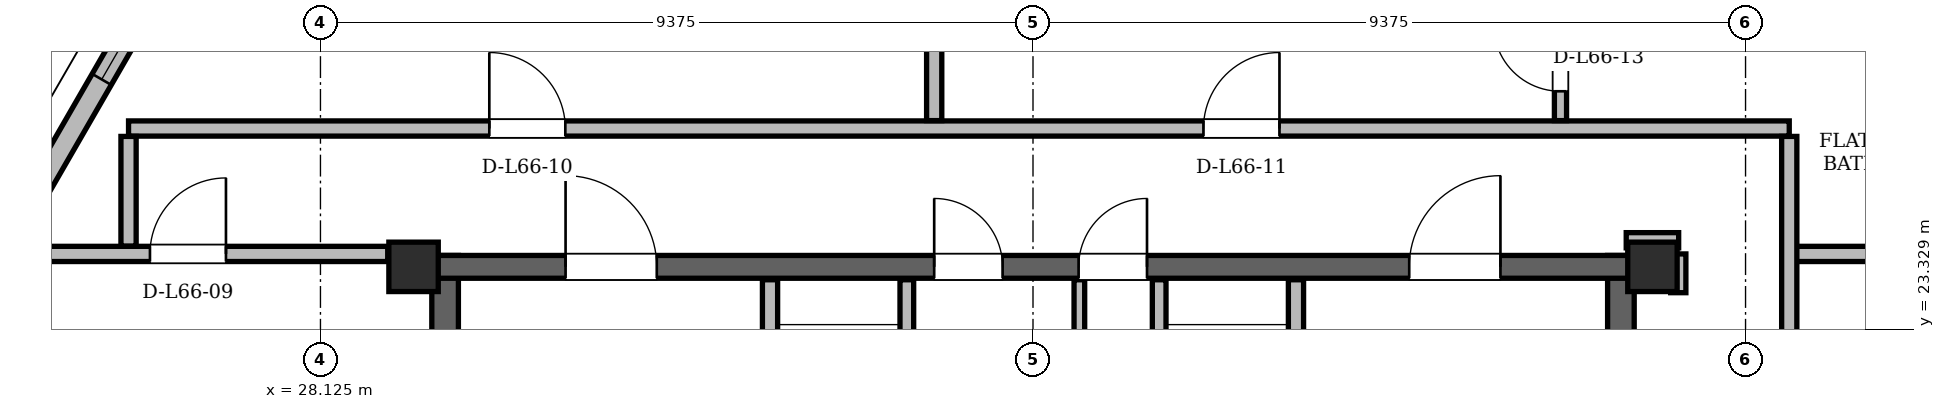
"""IFC4 building model, lengths in metres.
Left out: names, types, materials, properties, quantities, classifications, styles, units other than length and angle.
Written with IfcOpenShell. Run it as: python <this file> out.ifc"""

import sys

from ifc_helpers import new_model, si_unit, direction, frame, frame_2d, origin, origin_2d, place, context, subcontext, project, spatial, rectangle, hollow_rectangle, extrude, element, fill, save


model = new_model("IFC4")
c1 = context("Model", 3, precision=1e-05, world=origin(), true_north=direction((0.0, 1.0)))
c2 = subcontext(c1, "Body", "Model", "MODEL_VIEW")
j1 = project(units=[si_unit("LENGTHUNIT", "METRE"), si_unit("PLANEANGLEUNIT", "RADIAN")], contexts=[c1])
p1 = place(None, origin())
s1 = spatial("IfcSite", under=j1, at=p1, CompositionType="ELEMENT")
p2 = place(p1, origin())
s2 = spatial("IfcBuilding", under=s1, at=p2, CompositionType="ELEMENT")
p3 = place(p2, frame((0.0, 0.0, 249.9)))
s3 = spatial("IfcBuildingStorey", under=s2, at=p3, CompositionType="ELEMENT", Elevation=249.9)
for number, where, z_axis, x_axis in (
    (1, (45.65, 24.15, 0.0), (0.0, 0.0, 1.0), (1.0, 0.0, 0.0)),
    (2, (29.35, 24.15, 0.0), (0.0, 0.0, 1.0), (1.0, 0.0, 0.0)),
):
    element("IfcColumn", number, at=place(p3, frame(where, z_axis=z_axis, x_axis=x_axis)), inside=s3, PredefinedType="COLUMN", context=c2, shape_type="SweptSolid", body=[
        extrude(hollow_rectangle(XDim=0.65, YDim=0.65, WallThickness=0.05, at=origin_2d()), origin(), (0.0, 0.0, 1.0), 3.9),
    ])
for number, where, z_axis, x_axis in (
    (3, (29.765, 11.0, 0.0), (0.0, 0.0, 1.0), (0.0, 1.0, 0.0)),
    (4, (45.235, 11.0, 0.0), (0.0, 0.0, 1.0), (0.0, 1.0, 0.0)),
):
    element("IfcWall", number, at=place(p3, frame(where, z_axis=z_axis, x_axis=x_axis)), inside=s3, PredefinedType="SHEAR", context=c2, shape_type="SweptSolid", body=[
        extrude(rectangle(XDim=13.3, YDim=0.35, at=frame_2d((6.65, 0.0))), origin(), (0.0, 0.0, 1.0), 3.68),
    ])
p4 = place(p3, frame((29.65, 24.15, 0.0), z_axis=(0.0, 0.0, 1.0), x_axis=(1.0, 0.0, 0.0)))
e5 = element("IfcWall", 5, at=p4, inside=s3, PredefinedType="SHEAR", context=c2, shape_type="SweptSolid", body=[
    extrude(rectangle(XDim=15.7, YDim=0.3, at=frame_2d((7.85, 0.0))), origin(), (0.0, 0.0, 1.0), 3.68),
])
p5 = place(p4, frame((1.7, 0.0, 0.0)))
e6 = element("IfcOpeningElement", 6, at=p5, cuts=e5, PredefinedType="OPENING", context=c2, shape_type="SweptSolid", body=[
    extrude(rectangle(XDim=1.2, YDim=2.2, at=frame_2d((0.6, 1.1))), frame((0.0, 0.15, 0.0), z_axis=(0.0, -1.0, 0.0), x_axis=(1.0, 0.0, 0.0)), (0.0, 0.0, 1.0), 0.3),
])
p6 = place(p4, frame((12.8, 0.0, 0.0)))
e7 = element("IfcOpeningElement", 7, at=p6, cuts=e5, PredefinedType="OPENING", context=c2, shape_type="SweptSolid", body=[
    extrude(rectangle(XDim=1.2, YDim=2.2, at=frame_2d((0.6, 1.1))), frame((0.0, 0.15, 0.0), z_axis=(0.0, -1.0, 0.0), x_axis=(1.0, 0.0, 0.0)), (0.0, 0.0, 1.0), 0.3),
])
p7 = place(p4, frame((6.55, 0.0, 0.0)))
e8 = element("IfcOpeningElement", 8, at=p7, cuts=e5, PredefinedType="OPENING", context=c2, shape_type="SweptSolid", body=[
    extrude(rectangle(XDim=0.9, YDim=2.05, at=frame_2d((0.45, 1.025))), frame((0.0, 0.15, 0.0), z_axis=(0.0, -1.0, 0.0), x_axis=(1.0, 0.0, 0.0)), (0.0, 0.0, 1.0), 0.3),
])
p8 = place(p4, frame((8.45, 0.0, 0.0)))
e9 = element("IfcOpeningElement", 9, at=p8, cuts=e5, PredefinedType="OPENING", context=c2, shape_type="SweptSolid", body=[
    extrude(rectangle(XDim=0.9, YDim=2.05, at=frame_2d((0.45, 1.025))), frame((0.0, 0.15, 0.0), z_axis=(0.0, -1.0, 0.0), x_axis=(1.0, 0.0, 0.0)), (0.0, 0.0, 1.0), 0.3),
])
p9 = place(p3, frame((58.774, 10.99, 0.0), z_axis=(0.0, 0.0, 1.0), x_axis=(-0.499994896969, 0.866028350001, 0.0)))
e10 = element("IfcWall", 10, at=p9, inside=s3, PredefinedType="SOLIDWALL", context=c2, shape_type="SweptSolid", body=[
    extrude(rectangle(XDim=37.053, YDim=0.29, at=frame_2d((18.526, 0.0))), origin(), (0.0, 0.0, 1.0), 3.058),
])
p10 = place(p9, frame((6.789, 0.0, 0.0)))
e11 = element("IfcOpeningElement", 11, at=p10, cuts=e10, PredefinedType="OPENING", context=c2, shape_type="SweptSolid", body=[
    extrude(rectangle(XDim=1.5, YDim=2.2, at=frame_2d((0.75, 1.1))), frame((0.0, 0.145, 0.0), z_axis=(0.0, -1.0, 0.0), x_axis=(1.0, 0.0, 0.0)), (0.0, 0.0, 1.0), 0.29),
])
p11 = place(p9, frame((28.148, 0.0, 0.0)))
e12 = element("IfcOpeningElement", 12, at=p11, cuts=e10, PredefinedType="OPENING", context=c2, shape_type="SweptSolid", body=[
    extrude(rectangle(XDim=1.5, YDim=2.2, at=frame_2d((0.75, 1.1))), frame((0.0, 0.145, 0.0), z_axis=(0.0, -1.0, 0.0), x_axis=(1.0, 0.0, 0.0)), (0.0, 0.0, 1.0), 0.29),
])
p12 = place(p9, frame((12.184, 0.0, 0.85)))
e13 = element("IfcOpeningElement", 13, at=p12, cuts=e10, PredefinedType="OPENING", context=c2, shape_type="SweptSolid", body=[
    extrude(rectangle(XDim=2.6, YDim=1.95, at=frame_2d((1.3, 0.975))), frame((0.0, 0.145, 0.0), z_axis=(0.0, -1.0, 0.0), x_axis=(1.0, 0.0, 0.0)), (0.0, 0.0, 1.0), 0.29),
])
p13 = place(p9, frame((1.066, 0.0, 0.85)))
e14 = element("IfcOpeningElement", 14, at=p13, cuts=e10, PredefinedType="OPENING", context=c2, shape_type="SweptSolid", body=[
    extrude(rectangle(XDim=2.4, YDim=1.9, at=frame_2d((1.2, 0.95))), frame((0.0, 0.145, 0.0), z_axis=(0.0, -1.0, 0.0), x_axis=(1.0, 0.0, 0.0)), (0.0, 0.0, 1.0), 0.29),
])
p14 = place(p9, frame((33.328, 0.0, 0.85)))
e15 = element("IfcOpeningElement", 15, at=p14, cuts=e10, PredefinedType="OPENING", context=c2, shape_type="SweptSolid", body=[
    extrude(rectangle(XDim=1.2, YDim=1.48, at=frame_2d((0.6, 0.74))), frame((0.0, 0.145, 0.0), z_axis=(0.0, -1.0, 0.0), x_axis=(1.0, 0.0, 0.0)), (0.0, 0.0, 1.0), 0.29),
])
p15 = place(p9, frame((15.822, 0.0, 0.85)))
e16 = element("IfcOpeningElement", 16, at=p15, cuts=e10, PredefinedType="OPENING", context=c2, shape_type="SweptSolid", body=[
    extrude(rectangle(XDim=1.2, YDim=1.48, at=frame_2d((0.6, 0.74))), frame((0.0, 0.145, 0.0), z_axis=(0.0, -1.0, 0.0), x_axis=(1.0, 0.0, 0.0)), (0.0, 0.0, 1.0), 0.29),
])
p16 = place(p9, frame((23.327, 0.0, 0.85)))
e17 = element("IfcOpeningElement", 17, at=p16, cuts=e10, PredefinedType="OPENING", context=c2, shape_type="SweptSolid", body=[
    extrude(rectangle(XDim=1.2, YDim=1.48, at=frame_2d((0.6, 0.74))), frame((0.0, 0.145, 0.0), z_axis=(0.0, -1.0, 0.0), x_axis=(1.0, 0.0, 0.0)), (0.0, 0.0, 1.0), 0.29),
])
p17 = place(p3, frame((34.752, 43.079, 0.0), z_axis=(0.0, 0.0, 1.0), x_axis=(-0.499994896969, -0.866028350001, 0.0)))
e18 = element("IfcWall", 18, at=p17, inside=s3, PredefinedType="SOLIDWALL", context=c2, shape_type="SweptSolid", body=[
    extrude(rectangle(XDim=37.053, YDim=0.29, at=frame_2d((18.526, 0.0))), origin(), (0.0, 0.0, 1.0), 3.058),
])
p18 = place(p17, frame((3.639, 0.0, 0.0)))
e19 = element("IfcOpeningElement", 19, at=p18, cuts=e18, PredefinedType="OPENING", context=c2, shape_type="SweptSolid", body=[
    extrude(rectangle(XDim=1.5, YDim=2.2, at=frame_2d((0.75, 1.1))), frame((0.0, 0.145, 0.0), z_axis=(0.0, -1.0, 0.0), x_axis=(1.0, 0.0, 0.0)), (0.0, 0.0, 1.0), 0.29),
])
p19 = place(p17, frame((27.518, 0.0, 0.0)))
e20 = element("IfcOpeningElement", 20, at=p19, cuts=e18, PredefinedType="OPENING", context=c2, shape_type="SweptSolid", body=[
    extrude(rectangle(XDim=1.5, YDim=2.2, at=frame_2d((0.75, 1.1))), frame((0.0, 0.145, 0.0), z_axis=(0.0, -1.0, 0.0), x_axis=(1.0, 0.0, 0.0)), (0.0, 0.0, 1.0), 0.29),
])
p20 = place(p17, frame((22.803, 0.0, 0.85)))
e21 = element("IfcOpeningElement", 21, at=p20, cuts=e18, PredefinedType="OPENING", context=c2, shape_type="SweptSolid", body=[
    extrude(rectangle(XDim=1.6, YDim=1.7, at=frame_2d((0.8, 0.85))), frame((0.0, 0.145, 0.0), z_axis=(0.0, -1.0, 0.0), x_axis=(1.0, 0.0, 0.0)), (0.0, 0.0, 1.0), 0.29),
])
p21 = place(p17, frame((34.371, 0.0, 0.85)))
e22 = element("IfcOpeningElement", 22, at=p21, cuts=e18, PredefinedType="OPENING", context=c2, shape_type="SweptSolid", body=[
    extrude(rectangle(XDim=1.4, YDim=1.6, at=frame_2d((0.7, 0.8))), frame((0.0, 0.145, 0.0), z_axis=(0.0, -1.0, 0.0), x_axis=(1.0, 0.0, 0.0)), (0.0, 0.0, 1.0), 0.29),
])
p22 = place(p17, frame((8.135, 0.0, 0.85)))
e23 = element("IfcOpeningElement", 23, at=p22, cuts=e18, PredefinedType="OPENING", context=c2, shape_type="SweptSolid", body=[
    extrude(rectangle(XDim=1.8, YDim=1.75, at=frame_2d((0.9, 0.875))), frame((0.0, 0.145, 0.0), z_axis=(0.0, -1.0, 0.0), x_axis=(1.0, 0.0, 0.0)), (0.0, 0.0, 1.0), 0.29),
])
p23 = place(p17, frame((17.81, 0.0, 0.85)))
e24 = element("IfcOpeningElement", 24, at=p23, cuts=e18, PredefinedType="OPENING", context=c2, shape_type="SweptSolid", body=[
    extrude(rectangle(XDim=1.2, YDim=1.48, at=frame_2d((0.6, 0.74))), frame((0.0, 0.145, 0.0), z_axis=(0.0, -1.0, 0.0), x_axis=(1.0, 0.0, 0.0)), (0.0, 0.0, 1.0), 0.29),
])
p24 = place(p17, frame((1.294, 0.0, 0.85)))
e25 = element("IfcOpeningElement", 25, at=p24, cuts=e18, PredefinedType="OPENING", context=c2, shape_type="SweptSolid", body=[
    extrude(rectangle(XDim=1.6, YDim=1.7, at=frame_2d((0.8, 0.85))), frame((0.0, 0.145, 0.0), z_axis=(0.0, -1.0, 0.0), x_axis=(1.0, 0.0, 0.0)), (0.0, 0.0, 1.0), 0.29),
])
p25 = place(p3, frame((34.04, 19.48, 0.0), z_axis=(0.0, 0.0, 1.0), x_axis=(0.0, 1.0, 0.0)))
e26 = element("IfcWall", 26, at=p25, inside=s3, PredefinedType="PARTITIONING", context=c2, shape_type="SweptSolid", body=[
    extrude(rectangle(XDim=4.5, YDim=0.2, at=frame_2d((2.25, 0.0))), origin(), (0.0, 0.0, 1.0), 3.68),
])
p26 = place(p25, frame((2.12, 0.0, 0.0)))
e27 = element("IfcOpeningElement", 27, at=p26, cuts=e26, PredefinedType="OPENING", context=c2, shape_type="SweptSolid", body=[
    extrude(rectangle(XDim=1.1, YDim=2.2, at=frame_2d((0.55, 1.1))), frame((0.0, 0.1, 0.0), z_axis=(0.0, -1.0, 0.0), x_axis=(1.0, 0.0, 0.0)), (0.0, 0.0, 1.0), 0.2),
])
p27 = place(p3, frame((35.84, 20.96, 0.0), z_axis=(0.0, 0.0, 1.0), x_axis=(0.0, 1.0, 0.0)))
e28 = element("IfcWall", 28, at=p27, inside=s3, PredefinedType="PARTITIONING", context=c2, shape_type="SweptSolid", body=[
    extrude(rectangle(XDim=3.02, YDim=0.18, at=frame_2d((1.51, 0.0))), origin(), (0.0, 0.0, 1.0), 3.68),
])
p28 = place(p3, frame((40.96, 19.48, 0.0), z_axis=(0.0, 0.0, 1.0), x_axis=(0.0, 1.0, 0.0)))
e29 = element("IfcWall", 29, at=p28, inside=s3, PredefinedType="PARTITIONING", context=c2, shape_type="SweptSolid", body=[
    extrude(rectangle(XDim=4.5, YDim=0.2, at=frame_2d((2.25, 0.0))), origin(), (0.0, 0.0, 1.0), 3.68),
])
p29 = place(p28, frame((2.12, 0.0, 0.0)))
e30 = element("IfcOpeningElement", 30, at=p29, cuts=e29, PredefinedType="OPENING", context=c2, shape_type="SweptSolid", body=[
    extrude(rectangle(XDim=1.1, YDim=2.2, at=frame_2d((0.55, 1.1))), frame((0.0, 0.1, 0.0), z_axis=(0.0, -1.0, 0.0), x_axis=(1.0, 0.0, 0.0)), (0.0, 0.0, 1.0), 0.2),
])
p30 = place(p3, frame((39.16, 20.96, 0.0), z_axis=(0.0, 0.0, 1.0), x_axis=(0.0, 1.0, 0.0)))
e31 = element("IfcWall", 31, at=p30, inside=s3, PredefinedType="PARTITIONING", context=c2, shape_type="SweptSolid", body=[
    extrude(rectangle(XDim=3.02, YDim=0.18, at=frame_2d((1.51, 0.0))), origin(), (0.0, 0.0, 1.0), 3.68),
])
p31 = place(p3, frame((38.11, 21.06, 0.0), z_axis=(0.0, 0.0, 1.0), x_axis=(0.0, 1.0, 0.0)))
e32 = element("IfcWall", 32, at=p31, inside=s3, PredefinedType="PARTITIONING", context=c2, shape_type="SweptSolid", body=[
    extrude(rectangle(XDim=2.92, YDim=0.14, at=frame_2d((1.46, 0.0))), origin(), (0.0, 0.0, 1.0), 3.68),
])
p32 = place(p3, frame((24.094, 24.32, 0.0), z_axis=(0.0, 0.0, 1.0), x_axis=(1.0, 0.0, 0.0)))
e33 = element("IfcWall", 33, at=p32, inside=s3, PredefinedType="PARTITIONING", context=c2, shape_type="SweptSolid", body=[
    extrude(rectangle(XDim=4.917, YDim=0.2, at=frame_2d((2.458, 0.0))), origin(), (0.0, 0.0, 1.0), 3.68),
])
p33 = place(p32, frame((1.788, 0.0, 0.0)))
e34 = element("IfcOpeningElement", 34, at=p33, cuts=e33, PredefinedType="OPENING", context=c2, shape_type="SweptSolid", body=[
    extrude(rectangle(XDim=1.0, YDim=2.18, at=frame_2d((0.5, 1.09))), frame((0.0, 0.1, 0.0), z_axis=(0.0, -1.0, 0.0), x_axis=(1.0, 0.0, 0.0)), (0.0, 0.0, 1.0), 0.2),
])
p34 = place(p3, frame((47.45, 24.32, 0.0), z_axis=(0.0, 0.0, 1.0), x_axis=(1.0, 0.0, 0.0)))
e35 = element("IfcWall", 35, at=p34, inside=s3, PredefinedType="PARTITIONING", context=c2, shape_type="SweptSolid", body=[
    extrude(rectangle(XDim=3.457, YDim=0.2, at=frame_2d((1.728, 0.0))), origin(), (0.0, 0.0, 1.0), 3.68),
])
p35 = place(p3, frame((45.305, 24.5, 0.0), z_axis=(0.0, 0.0, 1.0), x_axis=(1.0, 0.0, 0.0)))
e36 = element("IfcWall", 36, at=p35, inside=s3, PredefinedType="PARTITIONING", context=c2, shape_type="SweptSolid", body=[
    extrude(rectangle(XDim=0.69, YDim=0.2, at=frame_2d((0.345, 0.0))), origin(), (0.0, 0.0, 1.0), 3.266),
])
p36 = place(p3, frame((25.6, 25.97, 0.0), z_axis=(0.0, 0.0, 1.0), x_axis=(1.0, 0.0, 0.0)))
e37 = element("IfcWall", 37, at=p36, inside=s3, PredefinedType="PARTITIONING", context=c2, shape_type="SweptSolid", body=[
    extrude(rectangle(XDim=21.85, YDim=0.2, at=frame_2d((10.925, 0.0))), origin(), (0.0, 0.0, 1.0), 3.266),
])
p37 = place(p36, frame((4.747, 0.0, 0.0)))
e38 = element("IfcOpeningElement", 38, at=p37, cuts=e37, PredefinedType="OPENING", context=c2, shape_type="SweptSolid", body=[
    extrude(rectangle(XDim=1.0, YDim=2.18, at=frame_2d((0.5, 1.09))), frame((0.0, 0.1, 0.0), z_axis=(0.0, -1.0, 0.0), x_axis=(1.0, 0.0, 0.0)), (0.0, 0.0, 1.0), 0.2),
])
p38 = place(p36, frame((14.143, 0.0, 0.0)))
e39 = element("IfcOpeningElement", 39, at=p38, cuts=e37, PredefinedType="OPENING", context=c2, shape_type="SweptSolid", body=[
    extrude(rectangle(XDim=1.0, YDim=2.18, at=frame_2d((0.5, 1.09))), frame((0.0, 0.1, 0.0), z_axis=(0.0, -1.0, 0.0), x_axis=(1.0, 0.0, 0.0)), (0.0, 0.0, 1.0), 0.2),
])
p39 = place(p3, frame((25.6, 24.424, 0.0), z_axis=(0.0, 0.0, 1.0), x_axis=(0.0, 1.0, 0.0)))
e40 = element("IfcWall", 40, at=p39, inside=s3, PredefinedType="PARTITIONING", context=c2, shape_type="SweptSolid", body=[
    extrude(rectangle(XDim=1.442, YDim=0.2, at=frame_2d((0.721, 0.0))), origin(), (0.0, 0.0, 1.0), 3.68),
])
p40 = place(p3, frame((36.2, 26.074, 0.0), z_axis=(0.0, 0.0, 1.0), x_axis=(0.0, 1.0, 0.0)))
e41 = element("IfcWall", 41, at=p40, inside=s3, PredefinedType="PARTITIONING", context=c2, shape_type="SweptSolid", body=[
    extrude(rectangle(XDim=16.856, YDim=0.2, at=frame_2d((8.428, 0.0))), origin(), (0.0, 0.0, 1.0), 3.68),
])
p41 = place(p3, frame((44.44, 26.074, 0.0), z_axis=(0.0, 0.0, 1.0), x_axis=(0.0, 1.0, 0.0)))
e42 = element("IfcWall", 42, at=p41, inside=s3, PredefinedType="PARTITIONING", context=c2, shape_type="SweptSolid", body=[
    extrude(rectangle(XDim=9.447, YDim=0.16, at=frame_2d((4.723, 0.0))), origin(), (0.0, 0.0, 1.0), 3.058),
])
p42 = place(p41, frame((0.386, 0.0, 0.0)))
e43 = element("IfcOpeningElement", 43, at=p42, cuts=e42, PredefinedType="OPENING", context=c2, shape_type="SweptSolid", body=[
    extrude(rectangle(XDim=0.88, YDim=2.08, at=frame_2d((0.44, 1.04))), frame((0.0, 0.08, 0.0), z_axis=(0.0, -1.0, 0.0), x_axis=(1.0, 0.0, 0.0)), (0.0, 0.0, 1.0), 0.16),
])
p43 = place(p41, frame((2.593, 0.0, 0.0)))
e44 = element("IfcOpeningElement", 44, at=p43, cuts=e42, PredefinedType="OPENING", context=c2, shape_type="SweptSolid", body=[
    extrude(rectangle(XDim=0.95, YDim=2.1, at=frame_2d((0.475, 1.05))), frame((0.0, 0.08, 0.0), z_axis=(0.0, -1.0, 0.0), x_axis=(1.0, 0.0, 0.0)), (0.0, 0.0, 1.0), 0.16),
])
p44 = place(p41, frame((5.468, 0.0, 0.0)))
e45 = element("IfcOpeningElement", 45, at=p44, cuts=e42, PredefinedType="OPENING", context=c2, shape_type="SweptSolid", body=[
    extrude(rectangle(XDim=0.95, YDim=2.1, at=frame_2d((0.475, 1.05))), frame((0.0, 0.08, 0.0), z_axis=(0.0, -1.0, 0.0), x_axis=(1.0, 0.0, 0.0)), (0.0, 0.0, 1.0), 0.16),
])
p45 = place(p3, frame((45.99, 23.81, 0.0), z_axis=(0.0, 0.0, 1.0), x_axis=(0.0, 1.0, 0.0)))
e46 = element("IfcWall", 46, at=p45, inside=s3, PredefinedType="PARTITIONING", context=c2, shape_type="SweptSolid", body=[
    extrude(rectangle(XDim=0.51, YDim=0.2, at=frame_2d((0.255, 0.0))), origin(), (0.0, 0.0, 1.0), 3.68),
])
p46 = place(p3, frame((47.45, 9.404, 0.0), z_axis=(0.0, 0.0, 1.0), x_axis=(0.0, 1.0, 0.0)))
e47 = element("IfcWall", 47, at=p46, inside=s3, PredefinedType="PARTITIONING", context=c2, shape_type="SweptSolid", body=[
    extrude(rectangle(XDim=16.462, YDim=0.2, at=frame_2d((8.231, 0.0))), origin(), (0.0, 0.0, 1.0), 3.266),
])
p47 = place(p46, frame((9.32, 0.0, 0.0)))
e48 = element("IfcOpeningElement", 48, at=p47, cuts=e47, PredefinedType="OPENING", context=c2, shape_type="SweptSolid", body=[
    extrude(rectangle(XDim=1.0, YDim=2.18, at=frame_2d((0.5, 1.09))), frame((0.0, 0.1, 0.0), z_axis=(0.0, -1.0, 0.0), x_axis=(1.0, 0.0, 0.0)), (0.0, 0.0, 1.0), 0.2),
])
p48 = place(p23, origin())
e49 = element("IfcWindow", 49, at=p48, inside=s3, PartitioningType="SINGLE_PANEL", PredefinedType="WINDOW", context=c2, shape_type="SweptSolid", body=[
    extrude(rectangle(XDim=1.2, YDim=1.48, at=frame_2d((0.6, 0.74))), frame((0.0, 0.03, 0.0), z_axis=(0.0, -1.0, 0.0), x_axis=(1.0, 0.0, 0.0)), (0.0, 0.0, 1.0), 0.06),
])
fill(e24, e49)
p49 = place(p5, origin())
e50 = element("IfcDoor", 50, at=p49, inside=s3, OperationType="SINGLE_SWING_LEFT", PredefinedType="DOOR", context=c2, shape_type="SweptSolid", body=[
    extrude(rectangle(XDim=1.2, YDim=2.2, at=frame_2d((0.6, 1.1))), frame((0.0, 0.025, 0.0), z_axis=(0.0, -1.0, 0.0), x_axis=(1.0, 0.0, 0.0)), (0.0, 0.0, 1.0), 0.05),
])
fill(e6, e50)
p50 = place(p6, origin())
e51 = element("IfcDoor", 51, at=p50, inside=s3, OperationType="SINGLE_SWING_RIGHT", PredefinedType="DOOR", context=c2, shape_type="SweptSolid", body=[
    extrude(rectangle(XDim=1.2, YDim=2.2, at=frame_2d((0.6, 1.1))), frame((0.0, 0.025, 0.0), z_axis=(0.0, -1.0, 0.0), x_axis=(1.0, 0.0, 0.0)), (0.0, 0.0, 1.0), 0.05),
])
fill(e7, e51)
p51 = place(p7, origin())
e52 = element("IfcDoor", 52, at=p51, inside=s3, OperationType="SINGLE_SWING_LEFT", PredefinedType="DOOR", context=c2, shape_type="SweptSolid", body=[
    extrude(rectangle(XDim=0.9, YDim=2.05, at=frame_2d((0.45, 1.025))), frame((0.0, 0.025, 0.0), z_axis=(0.0, -1.0, 0.0), x_axis=(1.0, 0.0, 0.0)), (0.0, 0.0, 1.0), 0.05),
])
fill(e8, e52)
p52 = place(p8, origin())
e53 = element("IfcDoor", 53, at=p52, inside=s3, OperationType="SINGLE_SWING_RIGHT", PredefinedType="DOOR", context=c2, shape_type="SweptSolid", body=[
    extrude(rectangle(XDim=0.9, YDim=2.05, at=frame_2d((0.45, 1.025))), frame((0.0, 0.025, 0.0), z_axis=(0.0, -1.0, 0.0), x_axis=(1.0, 0.0, 0.0)), (0.0, 0.0, 1.0), 0.05),
])
fill(e9, e53)
p53 = place(p33, origin())
e54 = element("IfcDoor", 54, at=p53, inside=s3, OperationType="SINGLE_SWING_RIGHT", PredefinedType="DOOR", context=c2, shape_type="SweptSolid", body=[
    extrude(rectangle(XDim=1.0, YDim=2.18, at=frame_2d((0.5, 1.09))), frame((0.0, 0.025, 0.0), z_axis=(0.0, -1.0, 0.0), x_axis=(1.0, 0.0, 0.0)), (0.0, 0.0, 1.0), 0.05),
])
fill(e34, e54)
p54 = place(p37, origin())
e55 = element("IfcDoor", 55, at=p54, inside=s3, OperationType="SINGLE_SWING_LEFT", PredefinedType="DOOR", context=c2, shape_type="SweptSolid", body=[
    extrude(rectangle(XDim=1.0, YDim=2.18, at=frame_2d((0.5, 1.09))), frame((0.0, 0.025, 0.0), z_axis=(0.0, -1.0, 0.0), x_axis=(1.0, 0.0, 0.0)), (0.0, 0.0, 1.0), 0.05),
])
fill(e38, e55)
p55 = place(p38, origin())
e56 = element("IfcDoor", 56, at=p55, inside=s3, OperationType="SINGLE_SWING_RIGHT", PredefinedType="DOOR", context=c2, shape_type="SweptSolid", body=[
    extrude(rectangle(XDim=1.0, YDim=2.18, at=frame_2d((0.5, 1.09))), frame((0.0, 0.025, 0.0), z_axis=(0.0, -1.0, 0.0), x_axis=(1.0, 0.0, 0.0)), (0.0, 0.0, 1.0), 0.05),
])
fill(e39, e56)
p56 = place(p42, origin())
e57 = element("IfcDoor", 57, at=p56, inside=s3, OperationType="SINGLE_SWING_RIGHT", PredefinedType="DOOR", context=c2, shape_type="SweptSolid", body=[
    extrude(rectangle(XDim=0.88, YDim=2.08, at=frame_2d((0.44, 1.04))), frame((0.0, 0.025, 0.0), z_axis=(0.0, -1.0, 0.0), x_axis=(1.0, 0.0, 0.0)), (0.0, 0.0, 1.0), 0.05),
])
fill(e43, e57)
save(model, sys.argv[1])
